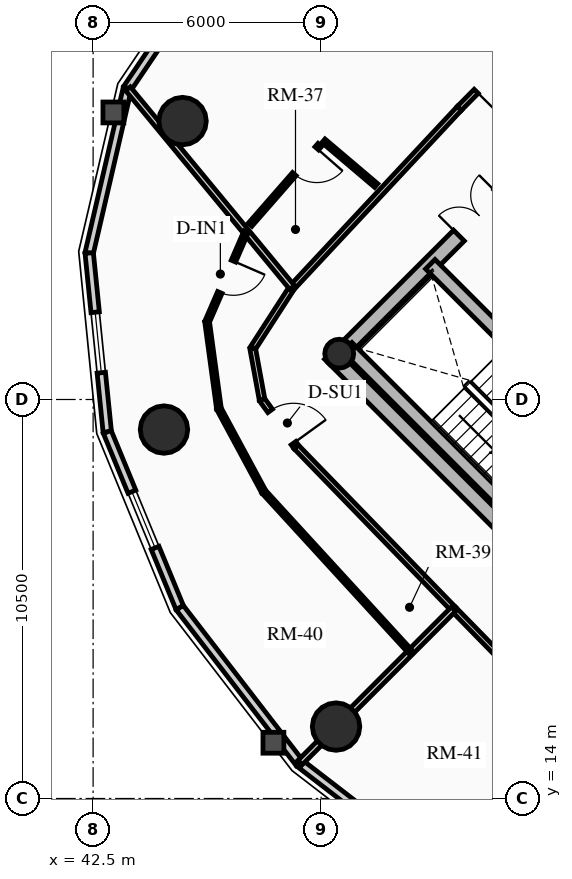
"""IFC4 building model, lengths in metres.
Left out: names, types, materials, properties, quantities, classifications, styles, units other than length and angle.
Written with IfcOpenShell. Run it as: python <this file> out.ifc"""

import sys

from ifc_helpers import new_model, si_unit, direction, frame, frame_2d, origin, origin_2d, place, context, subcontext, project, spatial, rectangle, circle, hollow_circle, extrude, source, transform, mapped, element, fill, save


model = new_model("IFC4")
c1 = context("Model", 3, precision=1e-05, world=origin(), true_north=direction((0.0, 1.0)))
c2 = subcontext(c1, "Body", "Model", "MODEL_VIEW")
j1 = project(units=[si_unit("LENGTHUNIT", "METRE"), si_unit("PLANEANGLEUNIT", "RADIAN")], contexts=[c1])
p1 = place(None, origin())
s1 = spatial("IfcSite", under=j1, at=p1, CompositionType="ELEMENT")
p2 = place(p1, origin())
s2 = spatial("IfcBuilding", under=s1, at=p2, CompositionType="ELEMENT")
p3 = place(p2, frame((0.0, 0.0, 183.61)))
s3 = spatial("IfcBuildingStorey", under=s2, at=p3, CompositionType="ELEMENT", Elevation=183.61)
p4 = place(p3, frame((58.702, 15.732, 0.0), z_axis=(0.0, 0.0, 1.0), x_axis=(-0.707106781187, 0.707106781187, 0.0)))
e1 = element("IfcWall", 1, at=p4, inside=s3, PredefinedType="SHEAR", context=c2, shape_type="SweptSolid", body=[
    extrude(rectangle(XDim=14.1, YDim=0.4, at=frame_2d((7.05, 0.0))), origin(), (0.0, 0.0, 1.0), 2.91),
])
p5 = place(p3, frame((48.873, 25.561, 0.0), z_axis=(0.0, 0.0, 1.0), x_axis=(0.707106781187, 0.707106781187, 0.0)))
e2 = element("IfcWall", 2, at=p5, inside=s3, PredefinedType="SHEAR", context=c2, shape_type="SweptSolid", body=[
    extrude(rectangle(XDim=10.7, YDim=0.4, at=frame_2d((5.35, 0.0))), origin(), (0.0, 0.0, 1.0), 2.91),
])
m1 = source(origin(), c2, "Body", "SweptSolid", [
    extrude(rectangle(XDim=1.5, YDim=2.02, at=frame_2d((0.75, 1.01))), frame((0.0, 0.21, 0.0), z_axis=(0.0, -1.0, 0.0), x_axis=(1.0, 0.0, 0.0)), (0.0, 0.0, 1.0), 0.42),
])
p6 = place(p5, frame((4.6, 0.0, 0.0)))
e3 = element("IfcOpeningElement", 3, at=p6, cuts=e2, PredefinedType="OPENING", context=c2, shape_type="MappedRepresentation", body=[
    mapped(m1, transform((0.0, 0.0, 0.0), x_axis=(1.0, 0.0, 0.0), y_axis=(0.0, 1.0, 0.0), z_axis=(0.0, 0.0, 1.0), scale=1.0)),
])
p7 = place(p3, frame((61.06, 18.373, 0.0), z_axis=(0.0, 0.0, 1.0), x_axis=(-0.707106781187, 0.707106781187, 0.0)))
e4 = element("IfcWall", 4, at=p7, inside=s3, PredefinedType="SHEAR", context=c2, shape_type="SweptSolid", body=[
    extrude(rectangle(XDim=13.7, YDim=0.35, at=frame_2d((6.85, 0.0))), origin(), (0.0, 0.0, 1.0), 2.91),
])
m2 = source(origin(), c2, "Body", "SweptSolid", [
    extrude(rectangle(XDim=1.1, YDim=2.015, at=frame_2d((0.55, 1.007))), frame((0.0, 0.185, 0.0), z_axis=(0.0, -1.0, 0.0), x_axis=(1.0, 0.0, 0.0)), (0.0, 0.0, 1.0), 0.37),
])
p8 = place(p7, frame((4.85, 0.0, 0.0)))
e5 = element("IfcOpeningElement", 5, at=p8, cuts=e4, PredefinedType="OPENING", context=c2, shape_type="MappedRepresentation", body=[
    mapped(m2, transform((0.0, 0.0, 0.0), x_axis=(1.0, 0.0, 0.0), y_axis=(0.0, 1.0, 0.0), z_axis=(0.0, 0.0, 1.0), scale=1.0)),
])
p9 = place(p7, frame((0.625, 0.0, 0.0)))
e6 = element("IfcOpeningElement", 6, at=p9, cuts=e4, PredefinedType="OPENING", context=c2, shape_type="MappedRepresentation", body=[
    mapped(m2, transform((0.0, 0.0, 0.0), x_axis=(1.0, 0.0, 0.0), y_axis=(0.0, 1.0, 0.0), z_axis=(0.0, 0.0, 1.0), scale=1.0)),
])
p10 = place(p7, frame((2.625, 0.0, 0.0)))
e7 = element("IfcOpeningElement", 7, at=p10, cuts=e4, PredefinedType="OPENING", context=c2, shape_type="MappedRepresentation", body=[
    mapped(m2, transform((0.0, 0.0, 0.0), x_axis=(1.0, 0.0, 0.0), y_axis=(0.0, 1.0, 0.0), z_axis=(0.0, 0.0, 1.0), scale=1.0)),
])
m3 = source(origin(), c2, "Body", "SweptSolid", [
    extrude(rectangle(XDim=1.15, YDim=2.02, at=frame_2d((0.575, 1.01))), frame((0.0, 0.185, 0.0), z_axis=(0.0, -1.0, 0.0), x_axis=(1.0, 0.0, 0.0)), (0.0, 0.0, 1.0), 0.37),
])
p11 = place(p7, frame((7.27, 0.0, 0.0)))
e8 = element("IfcOpeningElement", 8, at=p11, cuts=e4, PredefinedType="OPENING", context=c2, shape_type="MappedRepresentation", body=[
    mapped(m3, transform((0.0, 0.0, 0.0), x_axis=(1.0, 0.0, 0.0), y_axis=(0.0, 1.0, 0.0), z_axis=(0.0, 0.0, 1.0), scale=1.0)),
])
p12 = place(p3, frame((53.922, 21.141, 0.0), z_axis=(0.0, 0.0, 1.0), x_axis=(-0.707106781187, 0.707106781187, 0.0)))
e9 = element("IfcWall", 9, at=p12, inside=s3, PredefinedType="SHEAR", context=c2, shape_type="SweptSolid", body=[
    extrude(rectangle(XDim=6.695, YDim=0.35, at=frame_2d((3.348, 0.0))), origin(), (0.0, 0.0, 1.0), 2.91),
])
p13 = place(p3, frame((48.976, 25.706, 0.0), z_axis=(0.0, 0.0, 1.0), x_axis=(0.707106781187, 0.707106781187, 0.0)))
e10 = element("IfcColumn", 10, at=p13, inside=s3, PredefinedType="COLUMN", context=c2, shape_type="SweptSolid", body=[
    extrude(hollow_circle(Radius=0.38, WallThickness=0.032, at=origin_2d()), origin(), (0.0, 0.0, 1.0), 2.91),
])
for number, where, z_axis, x_axis in (
    (11, (44.854, 31.827, 0.0), (0.0, 0.0, 1.0), (1.0, 0.0, 0.0)),
    (12, (44.365, 23.709, 0.0), (0.0, 0.0, 1.0), (1.0, 0.0, 0.0)),
    (13, (48.893, 15.893, 0.0), (0.0, 0.0, 1.0), (1.0, 0.0, 0.0)),
):
    element("IfcColumn", number, at=place(p3, frame(where, z_axis=z_axis, x_axis=x_axis)), inside=s3, PredefinedType="USERDEFINED", context=c2, shape_type="SweptSolid", body=[
        extrude(circle(Radius=0.625, at=origin_2d()), origin(), (0.0, 0.0, 1.0), 2.91),
    ])
p14 = place(p3, frame((43.4, 32.687, 0.0), z_axis=(0.0, 0.0, 1.0), x_axis=(0.55951912514, 0.828817439852, 0.0)))
e14 = element("IfcWall", 14, at=p14, inside=s3, PredefinedType="SOLIDWALL", context=c2, shape_type="SweptSolid", body=[
    extrude(rectangle(XDim=4.259, YDim=0.22, at=frame_2d((2.129, 0.0))), origin(), (0.0, 0.0, 1.0), 2.245),
])
m4 = source(origin(), c2, "Body", "SweptSolid", [
    extrude(rectangle(XDim=1.6, YDim=1.3, at=frame_2d((0.8, 0.65))), frame((0.0, 0.12, 0.0), z_axis=(0.0, -1.0, 0.0), x_axis=(1.0, 0.0, 0.0)), (0.0, 0.0, 1.0), 0.24),
])
p15 = place(p14, frame((1.33, 0.0, 0.65)))
e15 = element("IfcOpeningElement", 15, at=p15, cuts=e14, PredefinedType="OPENING", context=c2, shape_type="MappedRepresentation", body=[
    mapped(m4, transform((0.0, 0.0, 0.0), x_axis=(1.0, 0.0, 0.0), y_axis=(0.0, 1.0, 0.0), z_axis=(0.0, 0.0, 1.0), scale=1.0)),
])
p16 = place(p3, frame((42.397, 28.355, 0.0), z_axis=(0.0, 0.0, 1.0), x_axis=(0.22557328587, 0.97422620202, 0.0)))
e16 = element("IfcWall", 16, at=p16, inside=s3, PredefinedType="SOLIDWALL", context=c2, shape_type="SweptSolid", body=[
    extrude(rectangle(XDim=4.446, YDim=0.22, at=frame_2d((2.223, 0.0))), origin(), (0.0, 0.0, 1.0), 2.245),
])
p17 = place(p3, frame((42.873, 23.646, 0.0), z_axis=(0.0, 0.0, 1.0), x_axis=(-0.100438356004, 0.994943283129, 0.0)))
e17 = element("IfcWall", 17, at=p17, inside=s3, PredefinedType="SOLIDWALL", context=c2, shape_type="SweptSolid", body=[
    extrude(rectangle(XDim=4.733, YDim=0.22, at=frame_2d((2.366, 0.0))), origin(), (0.0, 0.0, 1.0), 2.245),
])
p18 = place(p17, frame((1.566, 0.0, 0.65)))
e18 = element("IfcOpeningElement", 18, at=p18, cuts=e17, PredefinedType="OPENING", context=c2, shape_type="MappedRepresentation", body=[
    mapped(m4, transform((0.0, 0.0, 0.0), x_axis=(1.0, 0.0, 0.0), y_axis=(0.0, 1.0, 0.0), z_axis=(0.0, 0.0, 1.0), scale=1.0)),
])
p19 = place(p3, frame((44.78, 19.021, 0.0), z_axis=(0.0, 0.0, 1.0), x_axis=(-0.381196434348, 0.924494066201, 0.0)))
e19 = element("IfcWall", 19, at=p19, inside=s3, PredefinedType="SOLIDWALL", context=c2, shape_type="SweptSolid", body=[
    extrude(rectangle(XDim=5.003, YDim=0.22, at=frame_2d((2.501, 0.0))), origin(), (0.0, 0.0, 1.0), 2.245),
])
p20 = place(p19, frame((1.702, 0.0, 0.65)))
e20 = element("IfcOpeningElement", 20, at=p20, cuts=e19, PredefinedType="OPENING", context=c2, shape_type="MappedRepresentation", body=[
    mapped(m4, transform((0.0, 0.0, 0.0), x_axis=(1.0, 0.0, 0.0), y_axis=(0.0, 1.0, 0.0), z_axis=(0.0, 0.0, 1.0), scale=1.0)),
])
p21 = place(p3, frame((47.932, 14.932, 0.0), z_axis=(0.0, 0.0, 1.0), x_axis=(-0.610569654715, 0.791962560189, 0.0)))
e21 = element("IfcWall", 21, at=p21, inside=s3, PredefinedType="SOLIDWALL", context=c2, shape_type="SweptSolid", body=[
    extrude(rectangle(XDim=5.163, YDim=0.22, at=frame_2d((2.582, 0.0))), origin(), (0.0, 0.0, 1.0), 2.245),
])
p22 = place(p3, frame((52.021, 11.78, 0.0), z_axis=(0.0, 0.0, 1.0), x_axis=(-0.791962560189, 0.610569654715, 0.0)))
e22 = element("IfcWall", 22, at=p22, inside=s3, PredefinedType="SOLIDWALL", context=c2, shape_type="SweptSolid", body=[
    extrude(rectangle(XDim=5.163, YDim=0.22, at=frame_2d((2.582, 0.0))), origin(), (0.0, 0.0, 1.0), 2.245),
])
p23 = place(p22, frame((1.782, 0.0, 0.65)))
e23 = element("IfcOpeningElement", 23, at=p23, cuts=e22, PredefinedType="OPENING", context=c2, shape_type="MappedRepresentation", body=[
    mapped(m4, transform((0.0, 0.0, 0.0), x_axis=(1.0, 0.0, 0.0), y_axis=(0.0, 1.0, 0.0), z_axis=(0.0, 0.0, 1.0), scale=1.0)),
])
p24 = place(p3, frame((54.488, 34.535, 0.0), z_axis=(0.0, 0.0, 1.0), x_axis=(-0.703666289339, -0.710530613871, 0.0)))
e24 = element("IfcWall", 24, at=p24, inside=s3, PredefinedType="PARTITIONING", context=c2, shape_type="SweptSolid", body=[
    extrude(rectangle(XDim=3.343, YDim=0.15, at=frame_2d((1.672, 0.0))), origin(), (0.0, 0.0, 1.0), 2.245),
])
m5 = source(origin(), c2, "Body", "SweptSolid", [
    extrude(rectangle(XDim=1.05, YDim=2.015, at=frame_2d((0.525, 1.007))), frame((0.0, 0.085, 0.0), z_axis=(0.0, -1.0, 0.0), x_axis=(1.0, 0.0, 0.0)), (0.0, 0.0, 1.0), 0.17),
])
p25 = place(p24, frame((1.66, 0.0, 0.0)))
e25 = element("IfcOpeningElement", 25, at=p25, cuts=e24, PredefinedType="OPENING", context=c2, shape_type="MappedRepresentation", body=[
    mapped(m5, transform((0.0, 0.0, 0.0), x_axis=(1.0, 0.0, 0.0), y_axis=(0.0, 1.0, 0.0), z_axis=(0.0, 0.0, 1.0), scale=1.0)),
])
p26 = place(p3, frame((52.135, 32.159, 0.0), z_axis=(0.0, 0.0, 1.0), x_axis=(-0.682546302454, -0.730842353047, 0.0)))
e26 = element("IfcWall", 26, at=p26, inside=s3, PredefinedType="PARTITIONING", context=c2, shape_type="SweptSolid", body=[
    extrude(rectangle(XDim=6.445, YDim=0.15, at=frame_2d((3.223, 0.0))), origin(), (0.0, 0.0, 1.0), 2.245),
])
p27 = place(p3, frame((47.736, 27.449, 0.0), z_axis=(0.0, 0.0, 1.0), x_axis=(-0.542589259408, -0.839998152126, 0.0)))
e27 = element("IfcWall", 27, at=p27, inside=s3, PredefinedType="PARTITIONING", context=c2, shape_type="SweptSolid", body=[
    extrude(rectangle(XDim=1.912, YDim=0.15, at=frame_2d((0.956, 0.0))), origin(), (0.0, 0.0, 1.0), 2.245),
])
p28 = place(p3, frame((46.699, 25.843, 0.0), z_axis=(0.0, 0.0, 1.0), x_axis=(0.180451258011, -0.983583928032, 0.0)))
e28 = element("IfcWall", 28, at=p28, inside=s3, PredefinedType="PARTITIONING", context=c2, shape_type="SweptSolid", body=[
    extrude(rectangle(XDim=1.372, YDim=0.15, at=frame_2d((0.686, 0.0))), origin(), (0.0, 0.0, 1.0), 2.245),
])
p29 = place(p3, frame((46.946, 24.494, 0.0), z_axis=(0.0, 0.0, 1.0), x_axis=(0.586340262528, -0.810064871809, 0.0)))
e29 = element("IfcWall", 29, at=p29, inside=s3, PredefinedType="PARTITIONING", context=c2, shape_type="SweptSolid", body=[
    extrude(rectangle(XDim=1.531, YDim=0.15, at=frame_2d((0.766, 0.0))), origin(), (0.0, 0.0, 1.0), 2.245),
])
p30 = place(p29, frame((0.361, 0.0, 0.0)))
e30 = element("IfcOpeningElement", 30, at=p30, cuts=e29, PredefinedType="OPENING", context=c2, shape_type="MappedRepresentation", body=[
    mapped(m5, transform((0.0, 0.0, 0.0), x_axis=(1.0, 0.0, 0.0), y_axis=(0.0, 1.0, 0.0), z_axis=(0.0, 0.0, 1.0), scale=1.0)),
])
p31 = place(p3, frame((47.844, 23.253, 0.0), z_axis=(0.0, 0.0, 1.0), x_axis=(0.696248411352, -0.717800912293, 0.0)))
e31 = element("IfcWall", 31, at=p31, inside=s3, PredefinedType="PARTITIONING", context=c2, shape_type="SweptSolid", body=[
    extrude(rectangle(XDim=5.947, YDim=0.15, at=frame_2d((2.974, 0.0))), origin(), (0.0, 0.0, 1.0), 2.675),
])
p32 = place(p3, frame((51.985, 18.985, 0.0), z_axis=(0.0, 0.0, 1.0), x_axis=(0.699619654291, -0.714515457726, 0.0)))
e32 = element("IfcWall", 32, at=p32, inside=s3, PredefinedType="PARTITIONING", context=c2, shape_type="SweptSolid", body=[
    extrude(rectangle(XDim=6.064, YDim=0.15, at=frame_2d((3.032, 0.0))), origin(), (0.0, 0.0, 1.0), 2.245),
])
p33 = place(p3, frame((47.736, 27.449, 0.0), z_axis=(0.0, 0.0, 1.0), x_axis=(-0.636785609289, 0.771040911886, 0.0)))
e33 = element("IfcWall", 33, at=p33, inside=s3, PredefinedType="PARTITIONING", context=c2, shape_type="SweptSolid", body=[
    extrude(rectangle(XDim=6.781, YDim=0.16, at=frame_2d((3.391, 0.0))), origin(), (0.0, 0.0, 1.0), 2.245),
])
p34 = place(p3, frame((51.985, 18.985, 0.0), z_axis=(0.0, 0.0, 1.0), x_axis=(-0.707106781187, -0.707106781187, 0.0)))
e34 = element("IfcWall", 34, at=p34, inside=s3, PredefinedType="PARTITIONING", context=c2, shape_type="SweptSolid", body=[
    extrude(rectangle(XDim=5.711, YDim=0.16, at=frame_2d((2.855, 0.0))), origin(), (0.0, 0.0, 1.0), 2.245),
])
p35 = place(p3, frame((49.949, 30.13, 0.0), z_axis=(0.0, 0.0, 1.0), x_axis=(-0.76253118385, 0.646951461592, 0.0)))
e35 = element("IfcWall", 35, at=p35, inside=s3, PredefinedType="PARTITIONING", context=c2, shape_type="SweptSolid", body=[
    extrude(rectangle(XDim=1.821, YDim=0.125, at=frame_2d((0.91, 0.0))), origin(), (0.0, 0.0, 1.0), 2.675),
])
p36 = place(p3, frame((48.465, 31.199, 0.0), z_axis=(0.0, 0.0, 1.0), x_axis=(-0.658113718436, -0.752918543805, 0.0)))
e36 = element("IfcWall", 36, at=p36, inside=s3, PredefinedType="PARTITIONING", context=c2, shape_type="SweptSolid", body=[
    extrude(rectangle(XDim=2.786, YDim=0.125, at=frame_2d((1.393, 0.0))), origin(), (0.0, 0.0, 1.0), 2.245),
])
m6 = source(origin(), c2, "Body", "SweptSolid", [
    extrude(rectangle(XDim=0.9, YDim=2.005, at=frame_2d((0.45, 1.002))), frame((0.0, 0.073, 0.0), z_axis=(0.0, -1.0, 0.0), x_axis=(1.0, 0.0, 0.0)), (0.0, 0.0, 1.0), 0.145),
])
p37 = place(p36, frame((0.12, 0.0, 0.0)))
e37 = element("IfcOpeningElement", 37, at=p37, cuts=e36, PredefinedType="OPENING", context=c2, shape_type="MappedRepresentation", body=[
    mapped(m6, transform((0.0, 0.0, 0.0), x_axis=(1.0, 0.0, 0.0), y_axis=(0.0, 1.0, 0.0), z_axis=(0.0, 0.0, 1.0), scale=1.0)),
])
p38 = place(p3, frame((46.527, 28.913, 0.0), z_axis=(0.0, 0.0, 1.0), x_axis=(-0.398002989165, -0.917384118358, 0.0)))
e38 = element("IfcWall", 38, at=p38, inside=s3, PredefinedType="PARTITIONING", context=c2, shape_type="SweptSolid", body=[
    extrude(rectangle(XDim=2.581, YDim=0.125, at=frame_2d((1.29, 0.0))), origin(), (0.0, 0.0, 1.0), 2.245),
])
p39 = place(p38, frame((0.84, 0.0, 0.0)))
e39 = element("IfcOpeningElement", 39, at=p39, cuts=e38, PredefinedType="OPENING", context=c2, shape_type="MappedRepresentation", body=[
    mapped(m6, transform((0.0, 0.0, 0.0), x_axis=(1.0, 0.0, 0.0), y_axis=(0.0, 1.0, 0.0), z_axis=(0.0, 0.0, 1.0), scale=1.0)),
])
p40 = place(p3, frame((45.5, 26.546, 0.0), z_axis=(0.0, 0.0, 1.0), x_axis=(0.134877351861, -0.990862301208, 0.0)))
e40 = element("IfcWall", 40, at=p40, inside=s3, PredefinedType="PARTITIONING", context=c2, shape_type="SweptSolid", body=[
    extrude(rectangle(XDim=2.31, YDim=0.125, at=frame_2d((1.155, 0.0))), origin(), (0.0, 0.0, 1.0), 2.245),
])
p41 = place(p3, frame((45.811, 24.257, 0.0), z_axis=(0.0, 0.0, 1.0), x_axis=(0.474867364042, -0.880057376861, 0.0)))
e41 = element("IfcWall", 41, at=p41, inside=s3, PredefinedType="PARTITIONING", context=c2, shape_type="SweptSolid", body=[
    extrude(rectangle(XDim=2.484, YDim=0.125, at=frame_2d((1.242, 0.0))), origin(), (0.0, 0.0, 1.0), 2.245),
])
p42 = place(p3, frame((46.991, 22.071, 0.0), z_axis=(0.0, 0.0, 1.0), x_axis=(0.675455872419, -0.737400409828, 0.0)))
e42 = element("IfcWall", 42, at=p42, inside=s3, PredefinedType="PARTITIONING", context=c2, shape_type="SweptSolid", body=[
    extrude(rectangle(XDim=5.719, YDim=0.125, at=frame_2d((2.859, 0.0))), origin(), (0.0, 0.0, 1.0), 2.675),
])
m7 = source(origin(), c2, "Body", "SweptSolid", [
    extrude(rectangle(XDim=1.6, YDim=1.3, at=frame_2d((0.8, 0.65))), frame((0.0, 0.03, 0.0), z_axis=(0.0, -1.0, 0.0), x_axis=(1.0, 0.0, 0.0)), (0.0, 0.0, 1.0), 0.06),
])
p43 = place(p18, origin())
e43 = element("IfcWindow", 43, at=p43, inside=s3, PartitioningType="SINGLE_PANEL", PredefinedType="WINDOW", context=c2, shape_type="MappedRepresentation", body=[
    mapped(m7, transform((0.0, 0.0, 0.0), x_axis=(1.0, 0.0, 0.0), y_axis=(0.0, 1.0, 0.0), z_axis=(0.0, 0.0, 1.0), scale=1.0)),
])
fill(e18, e43)
p44 = place(p20, origin())
e44 = element("IfcWindow", 44, at=p44, inside=s3, PartitioningType="SINGLE_PANEL", PredefinedType="WINDOW", context=c2, shape_type="MappedRepresentation", body=[
    mapped(m7, transform((0.0, 0.0, 0.0), x_axis=(1.0, 0.0, 0.0), y_axis=(0.0, 1.0, 0.0), z_axis=(0.0, 0.0, 1.0), scale=1.0)),
])
fill(e20, e44)
m8 = source(origin(), c2, "Body", "SweptSolid", [
    extrude(rectangle(XDim=1.5, YDim=2.02, at=frame_2d((0.75, 1.01))), frame((0.0, 0.025, 0.0), z_axis=(0.0, -1.0, 0.0), x_axis=(1.0, 0.0, 0.0)), (0.0, 0.0, 1.0), 0.05),
])
p45 = place(p6, origin())
e45 = element("IfcDoor", 45, at=p45, inside=s3, OperationType="DOUBLE_DOOR_SINGLE_SWING", PredefinedType="DOOR", context=c2, shape_type="MappedRepresentation", body=[
    mapped(m8, transform((0.0, 0.0, 0.0), x_axis=(1.0, 0.0, 0.0), y_axis=(0.0, 1.0, 0.0), z_axis=(0.0, 0.0, 1.0), scale=1.0)),
])
fill(e3, e45)
m9 = source(origin(), c2, "Body", "SweptSolid", [
    extrude(rectangle(XDim=1.05, YDim=2.015, at=frame_2d((0.525, 1.007))), frame((0.0, 0.025, 0.0), z_axis=(0.0, -1.0, 0.0), x_axis=(1.0, 0.0, 0.0)), (0.0, 0.0, 1.0), 0.05),
])
p46 = place(p25, origin())
e46 = element("IfcDoor", 46, at=p46, inside=s3, OperationType="SINGLE_SWING_RIGHT", PredefinedType="DOOR", context=c2, shape_type="MappedRepresentation", body=[
    mapped(m9, transform((0.0, 0.0, 0.0), x_axis=(1.0, 0.0, 0.0), y_axis=(0.0, 1.0, 0.0), z_axis=(0.0, 0.0, 1.0), scale=1.0)),
])
fill(e25, e46)
m10 = source(origin(), c2, "Body", "SweptSolid", [
    extrude(rectangle(XDim=0.9, YDim=2.005, at=frame_2d((0.45, 1.002))), frame((0.0, 0.025, 0.0), z_axis=(0.0, -1.0, 0.0), x_axis=(1.0, 0.0, 0.0)), (0.0, 0.0, 1.0), 0.05),
])
p47 = place(p37, origin())
e47 = element("IfcDoor", 47, at=p47, inside=s3, OperationType="SINGLE_SWING_LEFT", PredefinedType="DOOR", context=c2, shape_type="MappedRepresentation", body=[
    mapped(m10, transform((0.0, 0.0, 0.0), x_axis=(1.0, 0.0, 0.0), y_axis=(0.0, 1.0, 0.0), z_axis=(0.0, 0.0, 1.0), scale=1.0)),
])
fill(e37, e47)
p48 = place(p30, origin())
e48 = element("IfcDoor", 48, at=p48, inside=s3, OperationType="SINGLE_SWING_RIGHT", PredefinedType="DOOR", context=c2, shape_type="MappedRepresentation", body=[
    mapped(m9, transform((0.0, 0.0, 0.0), x_axis=(1.0, 0.0, 0.0), y_axis=(0.0, 1.0, 0.0), z_axis=(0.0, 0.0, 1.0), scale=1.0)),
])
fill(e30, e48)
p49 = place(p39, origin())
e49 = element("IfcDoor", 49, at=p49, inside=s3, OperationType="SINGLE_SWING_LEFT", PredefinedType="DOOR", context=c2, shape_type="MappedRepresentation", body=[
    mapped(m10, transform((0.0, 0.0, 0.0), x_axis=(1.0, 0.0, 0.0), y_axis=(0.0, 1.0, 0.0), z_axis=(0.0, 0.0, 1.0), scale=1.0)),
])
fill(e39, e49)
save(model, sys.argv[1])
